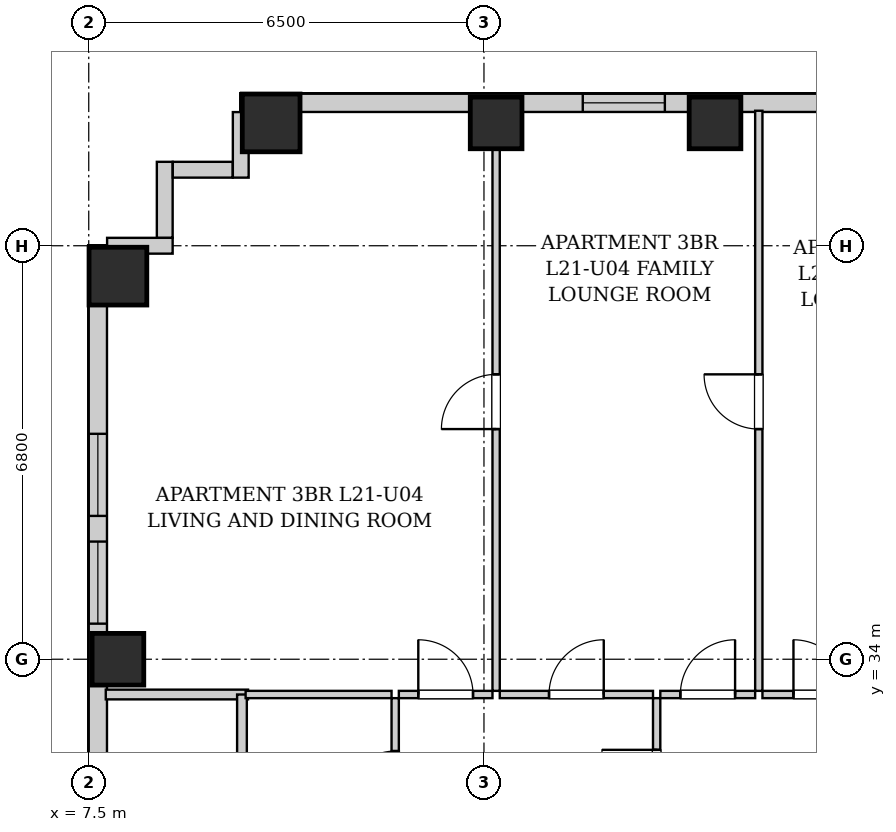
"""IFC4 building model, lengths in metres.
Left out: names, types, materials, properties, quantities, classifications, styles, units other than length and angle.
Written with IfcOpenShell. Run it as: python <this file> out.ifc"""

import sys

from ifc_helpers import new_model, si_unit, direction, frame, frame_2d, origin, origin_2d, place, context, subcontext, project, spatial, rectangle, extrude, element, fill, save


model = new_model("IFC4")
c1 = context("Model", 3, precision=1e-05, world=origin(), true_north=direction((0.0, 1.0)))
c2 = subcontext(c1, "Body", "Model", "MODEL_VIEW")
j1 = project(units=[si_unit("LENGTHUNIT", "METRE"), si_unit("PLANEANGLEUNIT", "RADIAN")], contexts=[c1])
p1 = place(None, origin())
s1 = spatial("IfcSite", under=j1, at=p1, CompositionType="ELEMENT")
p2 = place(p1, origin())
s2 = spatial("IfcBuilding", under=s1, at=p2, CompositionType="ELEMENT")
p3 = place(p2, frame((0.0, 0.0, 78.3)))
s3 = spatial("IfcBuildingStorey", under=s2, at=p3, CompositionType="ELEMENT", Elevation=78.3)
p4 = place(p3, frame((10.5, 42.82, 0.0), z_axis=(0.0, 0.0, 1.0), x_axis=(1.0, 0.0, 0.0)))
e1 = element("IfcColumn", 1, at=p4, inside=s3, PredefinedType="COLUMN", context=c2, shape_type="SweptSolid", body=[
    extrude(rectangle(XDim=0.95, YDim=0.95, at=origin_2d()), origin(), (0.0, 0.0, 1.0), 3.2),
])
for number, where, z_axis, x_axis in (
    (2, (14.2, 42.82, 0.0), (0.0, 0.0, 1.0), (1.0, 0.0, 0.0)),
    (3, (17.8, 42.82, 0.0), (0.0, 0.0, 1.0), (1.0, 0.0, 0.0)),
    (4, (7.98, 34.0, 0.0), (0.0, 0.0, 1.0), (1.0, 0.0, 0.0)),
):
    element("IfcColumn", number, at=place(p3, frame(where, z_axis=z_axis, x_axis=x_axis)), inside=s3, PredefinedType="COLUMN", context=c2, shape_type="SweptSolid", body=[
        extrude(rectangle(XDim=0.85, YDim=0.85, at=origin_2d()), origin(), (0.0, 0.0, 1.0), 3.2),
    ])
p5 = place(p3, frame((7.98, 40.3, 0.0), z_axis=(0.0, 0.0, 1.0), x_axis=(1.0, 0.0, 0.0)))
e5 = element("IfcColumn", 5, at=p5, inside=s3, PredefinedType="COLUMN", context=c2, shape_type="SweptSolid", body=[
    extrude(rectangle(XDim=0.95, YDim=0.95, at=origin_2d()), origin(), (0.0, 0.0, 1.0), 3.2),
])
p6 = place(p3, frame((10.0, 43.15, 0.0), z_axis=(0.0, 0.0, 1.0), x_axis=(1.0, 0.0, 0.0)))
e6 = element("IfcWall", 6, at=p6, inside=s3, PredefinedType="SOLIDWALL", context=c2, shape_type="SweptSolid", body=[
    extrude(rectangle(XDim=23.7, YDim=0.3, at=frame_2d((11.85, 0.0))), origin(), (0.0, 0.0, 1.0), 2.94),
])
p7 = place(p6, frame((5.625, 0.0, 0.55)))
e7 = element("IfcOpeningElement", 7, at=p7, cuts=e6, PredefinedType="OPENING", context=c2, shape_type="SweptSolid", body=[
    extrude(rectangle(XDim=1.35, YDim=1.2, at=frame_2d((0.675, 0.6))), frame((0.0, 0.16, 0.0), z_axis=(0.0, -1.0, 0.0), x_axis=(1.0, 0.0, 0.0)), (0.0, 0.0, 1.0), 0.32),
])
p8 = place(p6, frame((9.9, 0.0, 0.55)))
e8 = element("IfcOpeningElement", 8, at=p8, cuts=e6, PredefinedType="OPENING", context=c2, shape_type="SweptSolid", body=[
    extrude(rectangle(XDim=1.35, YDim=1.2, at=frame_2d((0.675, 0.6))), frame((0.0, 0.16, 0.0), z_axis=(0.0, -1.0, 0.0), x_axis=(1.0, 0.0, 0.0)), (0.0, 0.0, 1.0), 0.32),
])
p9 = place(p6, frame((18.675, 0.0, 0.55)))
e9 = element("IfcOpeningElement", 9, at=p9, cuts=e6, PredefinedType="OPENING", context=c2, shape_type="SweptSolid", body=[
    extrude(rectangle(XDim=1.35, YDim=1.2, at=frame_2d((0.675, 0.6))), frame((0.0, 0.16, 0.0), z_axis=(0.0, -1.0, 0.0), x_axis=(1.0, 0.0, 0.0)), (0.0, 0.0, 1.0), 0.32),
])
p10 = place(p6, frame((21.265, 0.0, 0.55)))
e10 = element("IfcOpeningElement", 10, at=p10, cuts=e6, PredefinedType="OPENING", context=c2, shape_type="SweptSolid", body=[
    extrude(rectangle(XDim=1.35, YDim=1.2, at=frame_2d((0.675, 0.6))), frame((0.0, 0.16, 0.0), z_axis=(0.0, -1.0, 0.0), x_axis=(1.0, 0.0, 0.0)), (0.0, 0.0, 1.0), 0.32),
])
p11 = place(p3, frame((7.65, 19.4, 0.0), z_axis=(0.0, 0.0, 1.0), x_axis=(0.0, 1.0, 0.0)))
e11 = element("IfcWall", 11, at=p11, inside=s3, PredefinedType="SOLIDWALL", context=c2, shape_type="SweptSolid", body=[
    extrude(rectangle(XDim=21.4, YDim=0.3, at=frame_2d((10.7, 0.0))), origin(), (0.0, 0.0, 1.0), 2.94),
])
p12 = place(p11, frame((16.957, 0.0, 0.55)))
e12 = element("IfcOpeningElement", 12, at=p12, cuts=e11, PredefinedType="OPENING", context=c2, shape_type="SweptSolid", body=[
    extrude(rectangle(XDim=1.35, YDim=1.2, at=frame_2d((0.675, 0.6))), frame((0.0, 0.16, 0.0), z_axis=(0.0, -1.0, 0.0), x_axis=(1.0, 0.0, 0.0)), (0.0, 0.0, 1.0), 0.32),
])
p13 = place(p11, frame((15.185, 0.0, 0.55)))
e13 = element("IfcOpeningElement", 13, at=p13, cuts=e11, PredefinedType="OPENING", context=c2, shape_type="SweptSolid", body=[
    extrude(rectangle(XDim=1.35, YDim=1.2, at=frame_2d((0.675, 0.6))), frame((0.0, 0.16, 0.0), z_axis=(0.0, -1.0, 0.0), x_axis=(1.0, 0.0, 0.0)), (0.0, 0.0, 1.0), 0.32),
])
p14 = place(p3, frame((7.802, 40.8, 0.0), z_axis=(0.0, 0.0, 1.0), x_axis=(1.0, 0.0, 0.0)))
e14 = element("IfcWall", 14, at=p14, inside=s3, PredefinedType="SOLIDWALL", context=c2, shape_type="SweptSolid", body=[
    extrude(rectangle(XDim=1.078, YDim=0.26, at=frame_2d((0.539, 0.0))), origin(), (0.0, 0.0, 1.0), 2.94),
])
p15 = place(p3, frame((8.75, 40.932, 0.0), z_axis=(0.0, 0.0, 1.0), x_axis=(0.0, 1.0, 0.0)))
e15 = element("IfcWall", 15, at=p15, inside=s3, PredefinedType="SOLIDWALL", context=c2, shape_type="SweptSolid", body=[
    extrude(rectangle(XDim=1.248, YDim=0.26, at=frame_2d((0.624, 0.0))), origin(), (0.0, 0.0, 1.0), 2.94),
])
p16 = place(p3, frame((8.882, 42.05, 0.0), z_axis=(0.0, 0.0, 1.0), x_axis=(1.0, 0.0, 0.0)))
e16 = element("IfcWall", 16, at=p16, inside=s3, PredefinedType="SOLIDWALL", context=c2, shape_type="SweptSolid", body=[
    extrude(rectangle(XDim=0.986, YDim=0.26, at=frame_2d((0.493, 0.0))), origin(), (0.0, 0.0, 1.0), 2.94),
])
p17 = place(p3, frame((10.0, 41.92, 0.0), z_axis=(0.0, 0.0, 1.0), x_axis=(0.0, 1.0, 0.0)))
e17 = element("IfcWall", 17, at=p17, inside=s3, PredefinedType="SOLIDWALL", context=c2, shape_type="SweptSolid", body=[
    extrude(rectangle(XDim=1.078, YDim=0.26, at=frame_2d((0.539, 0.0))), origin(), (0.0, 0.0, 1.0), 2.94),
])
p18 = place(p3, frame((7.78, 33.42, 0.0), z_axis=(0.0, 0.0, 1.0), x_axis=(1.0, 0.0, 0.0)))
e18 = element("IfcWall", 18, at=p18, inside=s3, PredefinedType="PARTITIONING", context=c2, shape_type="SweptSolid", body=[
    extrude(rectangle(XDim=2.34, YDim=0.16, at=frame_2d((1.17, 0.0))), origin(), (0.0, 0.0, 1.0), 2.94),
])
p19 = place(p3, frame((10.02, 30.76, 0.0), z_axis=(0.0, 0.0, 1.0), x_axis=(0.0, 1.0, 0.0)))
e19 = element("IfcWall", 19, at=p19, inside=s3, PredefinedType="PARTITIONING", context=c2, shape_type="SweptSolid", body=[
    extrude(rectangle(XDim=2.66, YDim=0.16, at=frame_2d((1.33, 0.0))), origin(), (0.0, 0.0, 1.0), 2.94),
])
p20 = place(p3, frame((12.54, 30.76, 0.0), z_axis=(0.0, 0.0, 1.0), x_axis=(0.0, 1.0, 0.0)))
e20 = element("IfcWall", 20, at=p20, inside=s3, PredefinedType="PARTITIONING", context=c2, shape_type="SweptSolid", body=[
    extrude(rectangle(XDim=2.6, YDim=0.12, at=frame_2d((1.3, 0.0))), origin(), (0.0, 0.0, 1.0), 2.94),
])
p21 = place(p20, frame((0.87, 0.0, 0.0)))
e21 = element("IfcOpeningElement", 21, at=p21, cuts=e20, PredefinedType="OPENING", context=c2, shape_type="SweptSolid", body=[
    extrude(rectangle(XDim=0.86, YDim=2.05, at=frame_2d((0.43, 1.025))), frame((0.0, 0.07, 0.0), z_axis=(0.0, -1.0, 0.0), x_axis=(1.0, 0.0, 0.0)), (0.0, 0.0, 1.0), 0.14),
])
p22 = place(p3, frame((10.08, 33.42, 0.0), z_axis=(0.0, 0.0, 1.0), x_axis=(1.0, 0.0, 0.0)))
e22 = element("IfcWall", 22, at=p22, inside=s3, PredefinedType="PARTITIONING", context=c2, shape_type="SweptSolid", body=[
    extrude(rectangle(XDim=2.4, YDim=0.12, at=frame_2d((1.2, 0.0))), origin(), (0.0, 0.0, 1.0), 2.94),
])
p23 = place(p3, frame((16.84, 30.76, 0.0), z_axis=(0.0, 0.0, 1.0), x_axis=(0.0, 1.0, 0.0)))
e23 = element("IfcWall", 23, at=p23, inside=s3, PredefinedType="PARTITIONING", context=c2, shape_type="SweptSolid", body=[
    extrude(rectangle(XDim=2.6, YDim=0.12, at=frame_2d((1.3, 0.0))), origin(), (0.0, 0.0, 1.0), 2.94),
])
p24 = place(p23, frame((0.85, 0.0, 0.0)))
e24 = element("IfcOpeningElement", 24, at=p24, cuts=e23, PredefinedType="OPENING", context=c2, shape_type="SweptSolid", body=[
    extrude(rectangle(XDim=0.9, YDim=2.05, at=frame_2d((0.45, 1.025))), frame((0.0, 0.07, 0.0), z_axis=(0.0, -1.0, 0.0), x_axis=(1.0, 0.0, 0.0)), (0.0, 0.0, 1.0), 0.14),
])
p25 = place(p3, frame((12.6, 33.42, 0.0), z_axis=(0.0, 0.0, 1.0), x_axis=(1.0, 0.0, 0.0)))
e25 = element("IfcWall", 25, at=p25, inside=s3, PredefinedType="PARTITIONING", context=c2, shape_type="SweptSolid", body=[
    extrude(rectangle(XDim=1.54, YDim=0.12, at=frame_2d((0.77, 0.0))), origin(), (0.0, 0.0, 1.0), 2.94),
])
p26 = place(p25, frame((0.32, 0.0, 0.0)))
e26 = element("IfcOpeningElement", 26, at=p26, cuts=e25, PredefinedType="OPENING", context=c2, shape_type="SweptSolid", body=[
    extrude(rectangle(XDim=0.9, YDim=2.05, at=frame_2d((0.45, 1.025))), frame((0.0, 0.07, 0.0), z_axis=(0.0, -1.0, 0.0), x_axis=(1.0, 0.0, 0.0)), (0.0, 0.0, 1.0), 0.14),
])
p27 = place(p3, frame((14.26, 33.42, 0.0), z_axis=(0.0, 0.0, 1.0), x_axis=(1.0, 0.0, 0.0)))
e27 = element("IfcWall", 27, at=p27, inside=s3, PredefinedType="PARTITIONING", context=c2, shape_type="SweptSolid", body=[
    extrude(rectangle(XDim=2.52, YDim=0.12, at=frame_2d((1.26, 0.0))), origin(), (0.0, 0.0, 1.0), 2.94),
])
p28 = place(p27, frame((0.81, 0.0, 0.0)))
e28 = element("IfcOpeningElement", 28, at=p28, cuts=e27, PredefinedType="OPENING", context=c2, shape_type="SweptSolid", body=[
    extrude(rectangle(XDim=0.9, YDim=2.05, at=frame_2d((0.45, 1.025))), frame((0.0, 0.07, 0.0), z_axis=(0.0, -1.0, 0.0), x_axis=(1.0, 0.0, 0.0)), (0.0, 0.0, 1.0), 0.14),
])
p29 = place(p3, frame((16.9, 33.42, 0.0), z_axis=(0.0, 0.0, 1.0), x_axis=(1.0, 0.0, 0.0)))
e29 = element("IfcWall", 29, at=p29, inside=s3, PredefinedType="PARTITIONING", context=c2, shape_type="SweptSolid", body=[
    extrude(rectangle(XDim=1.56, YDim=0.12, at=frame_2d((0.78, 0.0))), origin(), (0.0, 0.0, 1.0), 2.94),
])
p30 = place(p29, frame((0.33, 0.0, 0.0)))
e30 = element("IfcOpeningElement", 30, at=p30, cuts=e29, PredefinedType="OPENING", context=c2, shape_type="SweptSolid", body=[
    extrude(rectangle(XDim=0.9, YDim=2.05, at=frame_2d((0.45, 1.025))), frame((0.0, 0.07, 0.0), z_axis=(0.0, -1.0, 0.0), x_axis=(1.0, 0.0, 0.0)), (0.0, 0.0, 1.0), 0.14),
])
p31 = place(p3, frame((18.58, 33.42, 0.0), z_axis=(0.0, 0.0, 1.0), x_axis=(1.0, 0.0, 0.0)))
e31 = element("IfcWall", 31, at=p31, inside=s3, PredefinedType="PARTITIONING", context=c2, shape_type="SweptSolid", body=[
    extrude(rectangle(XDim=1.92, YDim=0.12, at=frame_2d((0.96, 0.0))), origin(), (0.0, 0.0, 1.0), 2.94),
])
p32 = place(p31, frame((0.51, 0.0, 0.0)))
e32 = element("IfcOpeningElement", 32, at=p32, cuts=e31, PredefinedType="OPENING", context=c2, shape_type="SweptSolid", body=[
    extrude(rectangle(XDim=0.9, YDim=2.05, at=frame_2d((0.45, 1.025))), frame((0.0, 0.07, 0.0), z_axis=(0.0, -1.0, 0.0), x_axis=(1.0, 0.0, 0.0)), (0.0, 0.0, 1.0), 0.14),
])
p33 = place(p3, frame((14.2, 33.48, 0.0), z_axis=(0.0, 0.0, 1.0), x_axis=(0.0, 1.0, 0.0)))
e33 = element("IfcWall", 33, at=p33, inside=s3, PredefinedType="PARTITIONING", context=c2, shape_type="SweptSolid", body=[
    extrude(rectangle(XDim=9.54, YDim=0.12, at=frame_2d((4.77, 0.0))), origin(), (0.0, 0.0, 1.0), 2.94),
])
p34 = place(p33, frame((4.305, 0.0, 0.0)))
e34 = element("IfcOpeningElement", 34, at=p34, cuts=e33, PredefinedType="OPENING", context=c2, shape_type="SweptSolid", body=[
    extrude(rectangle(XDim=0.9, YDim=2.05, at=frame_2d((0.45, 1.025))), frame((0.0, 0.07, 0.0), z_axis=(0.0, -1.0, 0.0), x_axis=(1.0, 0.0, 0.0)), (0.0, 0.0, 1.0), 0.14),
])
p35 = place(p3, frame((18.52, 33.48, 0.0), z_axis=(0.0, 0.0, 1.0), x_axis=(0.0, 1.0, 0.0)))
e35 = element("IfcWall", 35, at=p35, inside=s3, PredefinedType="PARTITIONING", context=c2, shape_type="SweptSolid", body=[
    extrude(rectangle(XDim=9.54, YDim=0.12, at=frame_2d((4.77, 0.0))), origin(), (0.0, 0.0, 1.0), 2.94),
])
p36 = place(p35, frame((4.305, 0.0, 0.0)))
e36 = element("IfcOpeningElement", 36, at=p36, cuts=e35, PredefinedType="OPENING", context=c2, shape_type="SweptSolid", body=[
    extrude(rectangle(XDim=0.9, YDim=2.05, at=frame_2d((0.45, 1.025))), frame((0.0, 0.07, 0.0), z_axis=(0.0, -1.0, 0.0), x_axis=(1.0, 0.0, 0.0)), (0.0, 0.0, 1.0), 0.14),
])
p37 = place(p21, origin())
e37 = element("IfcDoor", 37, at=p37, inside=s3, OperationType="SINGLE_SWING_LEFT", PredefinedType="DOOR", context=c2, shape_type="SweptSolid", body=[
    extrude(rectangle(XDim=0.86, YDim=2.05, at=frame_2d((0.43, 1.025))), frame((0.0, 0.025, 0.0), z_axis=(0.0, -1.0, 0.0), x_axis=(1.0, 0.0, 0.0)), (0.0, 0.0, 1.0), 0.05),
])
fill(e21, e37)
p38 = place(p24, origin())
e38 = element("IfcDoor", 38, at=p38, inside=s3, OperationType="SINGLE_SWING_RIGHT", PredefinedType="DOOR", context=c2, shape_type="SweptSolid", body=[
    extrude(rectangle(XDim=0.9, YDim=2.05, at=frame_2d((0.45, 1.025))), frame((0.0, 0.025, 0.0), z_axis=(0.0, -1.0, 0.0), x_axis=(1.0, 0.0, 0.0)), (0.0, 0.0, 1.0), 0.05),
])
fill(e24, e38)
p39 = place(p26, origin())
e39 = element("IfcDoor", 39, at=p39, inside=s3, OperationType="SINGLE_SWING_LEFT", PredefinedType="DOOR", context=c2, shape_type="SweptSolid", body=[
    extrude(rectangle(XDim=0.9, YDim=2.05, at=frame_2d((0.45, 1.025))), frame((0.0, 0.025, 0.0), z_axis=(0.0, -1.0, 0.0), x_axis=(1.0, 0.0, 0.0)), (0.0, 0.0, 1.0), 0.05),
])
fill(e26, e39)
p40 = place(p28, origin())
e40 = element("IfcDoor", 40, at=p40, inside=s3, OperationType="SINGLE_SWING_RIGHT", PredefinedType="DOOR", context=c2, shape_type="SweptSolid", body=[
    extrude(rectangle(XDim=0.9, YDim=2.05, at=frame_2d((0.45, 1.025))), frame((0.0, 0.025, 0.0), z_axis=(0.0, -1.0, 0.0), x_axis=(1.0, 0.0, 0.0)), (0.0, 0.0, 1.0), 0.05),
])
fill(e28, e40)
p41 = place(p30, origin())
e41 = element("IfcDoor", 41, at=p41, inside=s3, OperationType="SINGLE_SWING_RIGHT", PredefinedType="DOOR", context=c2, shape_type="SweptSolid", body=[
    extrude(rectangle(XDim=0.9, YDim=2.05, at=frame_2d((0.45, 1.025))), frame((0.0, 0.025, 0.0), z_axis=(0.0, -1.0, 0.0), x_axis=(1.0, 0.0, 0.0)), (0.0, 0.0, 1.0), 0.05),
])
fill(e30, e41)
p42 = place(p32, origin())
e42 = element("IfcDoor", 42, at=p42, inside=s3, OperationType="SINGLE_SWING_LEFT", PredefinedType="DOOR", context=c2, shape_type="SweptSolid", body=[
    extrude(rectangle(XDim=0.9, YDim=2.05, at=frame_2d((0.45, 1.025))), frame((0.0, 0.025, 0.0), z_axis=(0.0, -1.0, 0.0), x_axis=(1.0, 0.0, 0.0)), (0.0, 0.0, 1.0), 0.05),
])
fill(e32, e42)
p43 = place(p34, origin())
e43 = element("IfcDoor", 43, at=p43, inside=s3, OperationType="SINGLE_SWING_LEFT", PredefinedType="DOOR", context=c2, shape_type="SweptSolid", body=[
    extrude(rectangle(XDim=0.9, YDim=2.05, at=frame_2d((0.45, 1.025))), frame((0.0, 0.025, 0.0), z_axis=(0.0, -1.0, 0.0), x_axis=(1.0, 0.0, 0.0)), (0.0, 0.0, 1.0), 0.05),
])
fill(e34, e43)
p44 = place(p36, origin())
e44 = element("IfcDoor", 44, at=p44, inside=s3, OperationType="SINGLE_SWING_RIGHT", PredefinedType="DOOR", context=c2, shape_type="SweptSolid", body=[
    extrude(rectangle(XDim=0.9, YDim=2.05, at=frame_2d((0.45, 1.025))), frame((0.0, 0.025, 0.0), z_axis=(0.0, -1.0, 0.0), x_axis=(1.0, 0.0, 0.0)), (0.0, 0.0, 1.0), 0.05),
])
fill(e36, e44)
p45 = place(p12, origin())
e45 = element("IfcWindow", 45, at=p45, inside=s3, PartitioningType="SINGLE_PANEL", PredefinedType="WINDOW", context=c2, shape_type="SweptSolid", body=[
    extrude(rectangle(XDim=1.35, YDim=1.2, at=frame_2d((0.675, 0.6))), frame((0.0, 0.03, 0.0), z_axis=(0.0, -1.0, 0.0), x_axis=(1.0, 0.0, 0.0)), (0.0, 0.0, 1.0), 0.06),
])
fill(e12, e45)
p46 = place(p13, origin())
e46 = element("IfcWindow", 46, at=p46, inside=s3, PartitioningType="SINGLE_PANEL", PredefinedType="WINDOW", context=c2, shape_type="SweptSolid", body=[
    extrude(rectangle(XDim=1.35, YDim=1.2, at=frame_2d((0.675, 0.6))), frame((0.0, 0.03, 0.0), z_axis=(0.0, -1.0, 0.0), x_axis=(1.0, 0.0, 0.0)), (0.0, 0.0, 1.0), 0.06),
])
fill(e13, e46)
p47 = place(p7, origin())
e47 = element("IfcWindow", 47, at=p47, inside=s3, PartitioningType="SINGLE_PANEL", PredefinedType="WINDOW", context=c2, shape_type="SweptSolid", body=[
    extrude(rectangle(XDim=1.35, YDim=1.2, at=frame_2d((0.675, 0.6))), frame((0.0, 0.03, 0.0), z_axis=(0.0, -1.0, 0.0), x_axis=(1.0, 0.0, 0.0)), (0.0, 0.0, 1.0), 0.06),
])
fill(e7, e47)
save(model, sys.argv[1])
